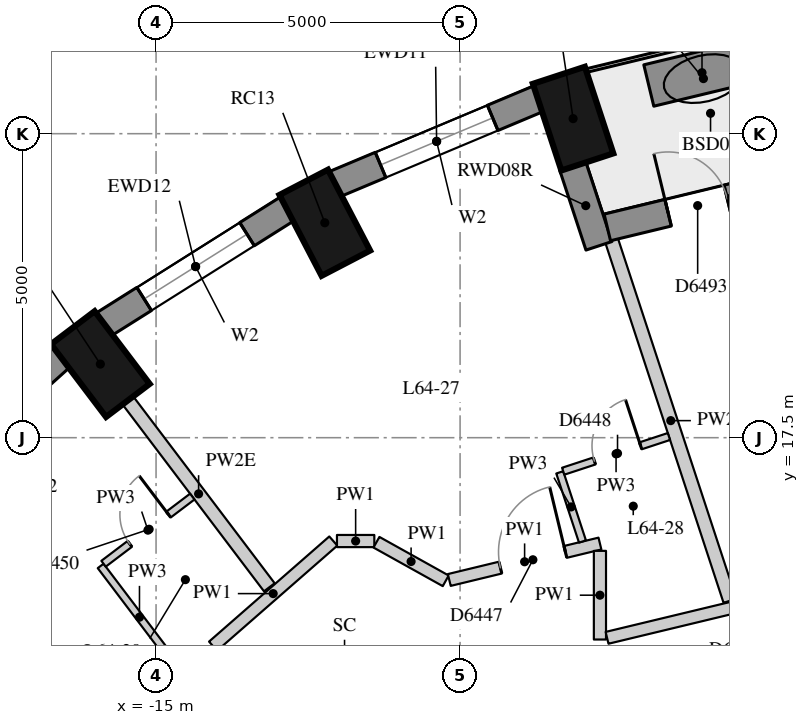
"""IFC4 building model, lengths in metres.
Left out: names, types, materials, properties, quantities, classifications, styles, units other than length and angle.
Written with IfcOpenShell. Run it as: python <this file> out.ifc"""

import sys

from ifc_helpers import new_model, si_unit, direction, frame, frame_2d, origin, origin_2d, place, context, subcontext, project, spatial, rectangle, extrude, element, fill, save


model = new_model("IFC4")
c1 = context("Model", 3, precision=1e-05, world=origin(), true_north=direction((0.0, 1.0)))
c2 = subcontext(c1, "Body", "Model", "MODEL_VIEW")
j1 = project(units=[si_unit("LENGTHUNIT", "METRE"), si_unit("PLANEANGLEUNIT", "RADIAN")], contexts=[c1])
p1 = place(None, origin())
s1 = spatial("IfcSite", under=j1, at=p1, CompositionType="ELEMENT")
p2 = place(p1, origin())
s2 = spatial("IfcBuilding", under=s1, at=p2, CompositionType="ELEMENT")
p3 = place(p2, frame((0.0, 0.0, 225.5)))
s3 = spatial("IfcBuildingStorey", under=s2, at=p3, CompositionType="ELEMENT", Elevation=225.5)
for number, where, z_axis, x_axis in (
    (1, (-8.141, 22.748, 0.0), (0.0, 0.0, 1.0), (-0.312, 0.95, 0.0)),
    (2, (-12.225, 21.035, 0.0), (0.0, 0.0, 1.0), (-0.462, 0.887, 0.0)),
    (3, (-15.916, 18.71, 0.0), (0.0, 0.0, 1.0), (-0.604, 0.797, 0.0)),
):
    element("IfcColumn", number, at=place(p3, frame(where, z_axis=z_axis, x_axis=x_axis)), inside=s3, PredefinedType="COLUMN", context=c2, shape_type="SweptSolid", body=[
        extrude(rectangle(XDim=1.5, YDim=0.9, at=origin_2d()), origin(), (0.0, 0.0, 1.0), 3.3),
    ])
p4 = place(p3, frame((-8.703, 23.079, 0.0), z_axis=(0.0, 0.0, 1.0), x_axis=(-0.922168222612, -0.386789050006, 0.0)))
e4 = element("IfcWall", 4, at=p4, inside=s3, PredefinedType="SOLIDWALL", context=c2, shape_type="SweptSolid", body=[
    extrude(rectangle(XDim=3.651, YDim=0.45, at=frame_2d((1.825, 0.0))), origin(), (0.0, 0.0, 1.0), 2.85),
])
p5 = place(p4, frame((0.825, 0.0, 0.4)))
e5 = element("IfcOpeningElement", 5, at=p5, cuts=e4, PredefinedType="OPENING", context=c2, shape_type="SweptSolid", body=[
    extrude(rectangle(XDim=2.0, YDim=1.75, at=frame_2d((1.0, 0.875))), frame((0.0, 0.235, 0.0), z_axis=(0.0, -1.0, 0.0), x_axis=(1.0, 0.0, 0.0)), (0.0, 0.0, 1.0), 0.47),
])
p6 = place(p3, frame((-12.832, 21.27, 0.0), z_axis=(0.0, 0.0, 1.0), x_axis=(-0.846138482752, -0.532963101918, 0.0)))
e6 = element("IfcWall", 6, at=p6, inside=s3, PredefinedType="SOLIDWALL", context=c2, shape_type="SweptSolid", body=[
    extrude(rectangle(XDim=3.587, YDim=0.45, at=frame_2d((1.793, 0.0))), origin(), (0.0, 0.0, 1.0), 2.85),
])
p7 = place(p6, frame((0.793, 0.0, 0.4)))
e7 = element("IfcOpeningElement", 7, at=p7, cuts=e6, PredefinedType="OPENING", context=c2, shape_type="SweptSolid", body=[
    extrude(rectangle(XDim=2.0, YDim=1.75, at=frame_2d((1.0, 0.875))), frame((0.0, 0.235, 0.0), z_axis=(0.0, -1.0, 0.0), x_axis=(1.0, 0.0, 0.0)), (0.0, 0.0, 1.0), 0.47),
])
p8 = place(p3, frame((-16.553, 18.84, 0.0), z_axis=(0.0, 0.0, 1.0), x_axis=(-0.743442727602, -0.668799604348, 0.0)))
e8 = element("IfcWall", 8, at=p8, inside=s3, PredefinedType="SOLIDWALL", context=c2, shape_type="SweptSolid", body=[
    extrude(rectangle(XDim=3.513, YDim=0.45, at=frame_2d((1.756, 0.0))), origin(), (0.0, 0.0, 1.0), 2.85),
])
p9 = place(p8, frame((0.756, 0.0, 0.4)))
e9 = element("IfcOpeningElement", 9, at=p9, cuts=e8, PredefinedType="OPENING", context=c2, shape_type="SweptSolid", body=[
    extrude(rectangle(XDim=2.0, YDim=1.75, at=frame_2d((1.0, 0.875))), frame((0.0, 0.235, 0.0), z_axis=(0.0, -1.0, 0.0), x_axis=(1.0, 0.0, 0.0)), (0.0, 0.0, 1.0), 0.47),
])
p10 = place(p3, frame((-8.15, 21.977, 0.0), z_axis=(0.0, 0.0, 1.0), x_axis=(0.312062715826, -0.950061504005, 0.0)))
e10 = element("IfcWall", 10, at=p10, inside=s3, PredefinedType="SOLIDWALL", context=c2, shape_type="SweptSolid", body=[
    extrude(rectangle(XDim=1.39, YDim=0.45, at=frame_2d((0.695, 0.0))), origin(), (0.0, 0.0, 1.0), 2.85),
])
p11 = place(p3, frame((-3.489, 21.947, 0.0), z_axis=(0.0, 0.0, 1.0), x_axis=(-0.972007311035, -0.234950606076, 0.0)))
e11 = element("IfcWall", 11, at=p11, inside=s3, PredefinedType="SOLIDWALL", context=c2, shape_type="SweptSolid", body=[
    extrude(rectangle(XDim=4.207, YDim=0.45, at=frame_2d((2.104, 0.0))), origin(), (0.0, 0.0, 1.0), 2.85),
])
p12 = place(p11, frame((1.029, 0.0, 0.4)))
e12 = element("IfcOpeningElement", 12, at=p12, cuts=e11, PredefinedType="OPENING", context=c2, shape_type="SweptSolid", body=[
    extrude(rectangle(XDim=1.0, YDim=1.75, at=frame_2d((0.5, 0.875))), frame((0.0, 0.235, 0.0), z_axis=(0.0, -1.0, 0.0), x_axis=(1.0, 0.0, 0.0)), (0.0, 0.0, 1.0), 0.47),
])
p13 = place(p11, frame((2.179, 0.0, 0.0)))
e13 = element("IfcOpeningElement", 13, at=p13, cuts=e11, PredefinedType="OPENING", context=c2, shape_type="SweptSolid", body=[
    extrude(rectangle(XDim=1.0, YDim=2.15, at=frame_2d((0.5, 1.075))), frame((0.0, 0.235, 0.0), z_axis=(0.0, -1.0, 0.0), x_axis=(1.0, 0.0, 0.0)), (0.0, 0.0, 1.0), 0.47),
])
p14 = place(p3, frame((-5.146, 23.714, 0.0), z_axis=(0.0, 0.0, 1.0), x_axis=(-0.972142986016, -0.234388597717, 0.0)))
e14 = element("IfcWall", 14, at=p14, inside=s3, PredefinedType="USERDEFINED", context=c2, shape_type="SweptSolid", body=[
    extrude(rectangle(XDim=1.8, YDim=0.7, at=frame_2d((0.9, 0.0))), origin(), (0.0, 0.0, 1.0), 0.75),
])
p15 = place(p3, frame((-14.063, 14.071, 0.0), z_axis=(0.0, 0.0, 1.0), x_axis=(0.752870230185, 0.6581689878, 0.0)))
e15 = element("IfcWall", 15, at=p15, inside=s3, PredefinedType="PARTITIONING", context=c2, shape_type="SweptSolid", body=[
    extrude(rectangle(XDim=2.627, YDim=0.2, at=frame_2d((1.313, 0.0))), origin(), (0.0, 0.0, 1.0), 2.85),
])
p16 = place(p3, frame((-12.025, 15.8, 0.0), z_axis=(0.0, 0.0, 1.0), x_axis=(1.0, 0.0, 0.0)))
e16 = element("IfcWall", 16, at=p16, inside=s3, PredefinedType="PARTITIONING", context=c2, shape_type="SweptSolid", body=[
    extrude(rectangle(XDim=0.615, YDim=0.2, at=frame_2d((0.307, 0.0))), origin(), (0.0, 0.0, 1.0), 2.85),
])
p17 = place(p3, frame((-11.375, 15.781, 0.0), z_axis=(0.0, 0.0, 1.0), x_axis=(0.873538410035, -0.486755222051, 0.0)))
e17 = element("IfcWall", 17, at=p17, inside=s3, PredefinedType="PARTITIONING", context=c2, shape_type="SweptSolid", body=[
    extrude(rectangle(XDim=1.304, YDim=0.2, at=frame_2d((0.652, 0.0))), origin(), (0.0, 0.0, 1.0), 2.85),
])
p18 = place(p3, frame((-10.177, 15.16, 0.0), z_axis=(0.0, 0.0, 1.0), x_axis=(0.971984190663, 0.235046236094, 0.0)))
e18 = element("IfcWall", 18, at=p18, inside=s3, PredefinedType="PARTITIONING", context=c2, shape_type="SweptSolid", body=[
    extrude(rectangle(XDim=2.549, YDim=0.2, at=frame_2d((1.274, 0.0))), origin(), (0.0, 0.0, 1.0), 2.85),
])
p19 = place(p18, frame((0.865, 0.0, 0.0)))
e19 = element("IfcOpeningElement", 19, at=p19, cuts=e18, PredefinedType="OPENING", context=c2, shape_type="SweptSolid", body=[
    extrude(rectangle(XDim=1.1, YDim=2.1, at=frame_2d((0.55, 1.05))), frame((0.0, 0.11, 0.0), z_axis=(0.0, -1.0, 0.0), x_axis=(1.0, 0.0, 0.0)), (0.0, 0.0, 1.0), 0.22),
])
p20 = place(p3, frame((-7.7, 15.639, 0.0), z_axis=(0.0, 0.0, 1.0), x_axis=(0.0, -1.0, 0.0)))
e20 = element("IfcWall", 20, at=p20, inside=s3, PredefinedType="PARTITIONING", context=c2, shape_type="SweptSolid", body=[
    extrude(rectangle(XDim=1.458, YDim=0.2, at=frame_2d((0.729, 0.0))), origin(), (0.0, 0.0, 1.0), 2.85),
])
p21 = place(p3, frame((-7.583, 14.208, 0.0), z_axis=(0.0, 0.0, 1.0), x_axis=(0.972284712223, 0.233799996531, 0.0)))
e21 = element("IfcWall", 21, at=p21, inside=s3, PredefinedType="PARTITIONING", context=c2, shape_type="SweptSolid", body=[
    extrude(rectangle(XDim=8.519, YDim=0.2, at=frame_2d((4.259, 0.0))), origin(), (0.0, 0.0, 1.0), 2.25),
])
p22 = place(p21, frame((5.667, 0.0, 0.0)))
e22 = element("IfcOpeningElement", 22, at=p22, cuts=e21, PredefinedType="OPENING", context=c2, shape_type="SweptSolid", body=[
    extrude(rectangle(XDim=0.9, YDim=2.1, at=frame_2d((0.45, 1.05))), frame((0.0, 0.11, 0.0), z_axis=(0.0, -1.0, 0.0), x_axis=(1.0, 0.0, 0.0)), (0.0, 0.0, 1.0), 0.22),
])
p23 = place(p21, frame((2.674, 0.0, 0.0)))
e23 = element("IfcOpeningElement", 23, at=p23, cuts=e21, PredefinedType="OPENING", context=c2, shape_type="SweptSolid", body=[
    extrude(rectangle(XDim=0.9, YDim=2.1, at=frame_2d((0.45, 1.05))), frame((0.0, 0.11, 0.0), z_axis=(0.0, -1.0, 0.0), x_axis=(1.0, 0.0, 0.0)), (0.0, 0.0, 1.0), 0.22),
])
p24 = place(p3, frame((-7.508, 20.743, 0.0), z_axis=(0.0, 0.0, 1.0), x_axis=(0.311985211021, -0.95008695818, 0.0)))
e24 = element("IfcWall", 24, at=p24, inside=s3, PredefinedType="PARTITIONING", context=c2, shape_type="SweptSolid", body=[
    extrude(rectangle(XDim=6.237, YDim=0.22, at=frame_2d((3.118, 0.0))), origin(), (0.0, 0.0, 1.0), 2.85),
])
p25 = place(p3, frame((-15.463, 18.113, 0.0), z_axis=(0.0, 0.0, 1.0), x_axis=(0.603591792806, -0.79729351412, 0.0)))
e25 = element("IfcWall", 25, at=p25, inside=s3, PredefinedType="PARTITIONING", context=c2, shape_type="SweptSolid", body=[
    extrude(rectangle(XDim=3.854, YDim=0.22, at=frame_2d((1.927, 0.0))), origin(), (0.0, 0.0, 1.0), 2.4),
])
p26 = place(p3, frame((-7.987, 15.792, 0.0), z_axis=(0.0, 0.0, 1.0), x_axis=(-0.312187467963, 0.950020518119, 0.0)))
e26 = element("IfcWall", 26, at=p26, inside=s3, PredefinedType="PARTITIONING", context=c2, shape_type="SweptSolid", body=[
    extrude(rectangle(XDim=1.197, YDim=0.12, at=frame_2d((0.599, 0.0))), origin(), (0.0, 0.0, 1.0), 2.85),
])
p27 = place(p3, frame((-14.634, 13.704, 0.0), z_axis=(0.0, 0.0, 1.0), x_axis=(-0.603613230526, 0.797277284221, 0.0)))
e27 = element("IfcWall", 27, at=p27, inside=s3, PredefinedType="PARTITIONING", context=c2, shape_type="SweptSolid", body=[
    extrude(rectangle(XDim=2.115, YDim=0.12, at=frame_2d((1.058, 0.0))), origin(), (0.0, 0.0, 1.0), 2.85),
])
p28 = place(p3, frame((-8.304, 16.948, 0.0), z_axis=(0.0, 0.0, 1.0), x_axis=(0.95011423119, 0.311902144415, 0.0)))
e28 = element("IfcWall", 28, at=p28, inside=s3, PredefinedType="PARTITIONING", context=c2, shape_type="SweptSolid", body=[
    extrude(rectangle(XDim=1.83, YDim=0.12, at=frame_2d((0.915, 0.0))), origin(), (0.0, 0.0, 1.0), 2.85),
])
p29 = place(p28, frame((0.54, 0.0, 0.0)))
e29 = element("IfcOpeningElement", 29, at=p29, cuts=e28, PredefinedType="OPENING", context=c2, shape_type="SweptSolid", body=[
    extrude(rectangle(XDim=0.8, YDim=2.1, at=frame_2d((0.4, 1.05))), frame((0.0, 0.07, 0.0), z_axis=(0.0, -1.0, 0.0), x_axis=(1.0, 0.0, 0.0)), (0.0, 0.0, 1.0), 0.14),
])
p30 = place(p3, frame((-15.863, 15.427, 0.0), z_axis=(0.0, 0.0, 1.0), x_axis=(0.79730226728, 0.603580230451, 0.0)))
e30 = element("IfcWall", 30, at=p30, inside=s3, PredefinedType="PARTITIONING", context=c2, shape_type="SweptSolid", body=[
    extrude(rectangle(XDim=1.83, YDim=0.12, at=frame_2d((0.915, 0.0))), origin(), (0.0, 0.0, 1.0), 2.85),
])
p31 = place(p30, frame((0.54, 0.0, 0.0)))
e31 = element("IfcOpeningElement", 31, at=p31, cuts=e30, PredefinedType="OPENING", context=c2, shape_type="SweptSolid", body=[
    extrude(rectangle(XDim=0.8, YDim=2.1, at=frame_2d((0.4, 1.05))), frame((0.0, 0.07, 0.0), z_axis=(0.0, -1.0, 0.0), x_axis=(1.0, 0.0, 0.0)), (0.0, 0.0, 1.0), 0.14),
])
p32 = place(p5, origin())
e32 = element("IfcWindow", 32, at=p32, inside=s3, PartitioningType="SINGLE_PANEL", PredefinedType="WINDOW", context=c2, shape_type="SweptSolid", body=[
    extrude(rectangle(XDim=2.0, YDim=1.75, at=frame_2d((1.0, 0.875))), frame((0.0, 0.035, 0.0), z_axis=(0.0, -1.0, 0.0), x_axis=(1.0, 0.0, 0.0)), (0.0, 0.0, 1.0), 0.06),
])
fill(e5, e32)
p33 = place(p7, origin())
e33 = element("IfcWindow", 33, at=p33, inside=s3, PartitioningType="SINGLE_PANEL", PredefinedType="WINDOW", context=c2, shape_type="SweptSolid", body=[
    extrude(rectangle(XDim=2.0, YDim=1.75, at=frame_2d((1.0, 0.875))), frame((0.0, 0.035, 0.0), z_axis=(0.0, -1.0, 0.0), x_axis=(1.0, 0.0, 0.0)), (0.0, 0.0, 1.0), 0.06),
])
fill(e7, e33)
p34 = place(p13, frame((1.0, 0.0, 0.0), z_axis=(0.0, 0.0, 1.0), x_axis=(-1.0, 0.0, 0.0)))
e34 = element("IfcDoor", 34, at=p34, inside=s3, OperationType="SINGLE_SWING_LEFT", PredefinedType="DOOR", context=c2, shape_type="SweptSolid", body=[
    extrude(rectangle(XDim=1.0, YDim=2.15, at=frame_2d((0.5, 1.075))), frame((0.0, 0.075, 0.0), z_axis=(0.0, -1.0, 0.0), x_axis=(1.0, 0.0, 0.0)), (0.0, 0.0, 1.0), 0.05),
])
fill(e13, e34)
p35 = place(p19, origin())
e35 = element("IfcDoor", 35, at=p35, inside=s3, OperationType="SINGLE_SWING_RIGHT", PredefinedType="DOOR", context=c2, shape_type="SweptSolid", body=[
    extrude(rectangle(XDim=1.1, YDim=2.1, at=frame_2d((0.55, 1.05))), frame((0.0, 0.025, 0.0), z_axis=(0.0, -1.0, 0.0), x_axis=(1.0, 0.0, 0.0)), (0.0, 0.0, 1.0), 0.05),
])
fill(e19, e35)
p36 = place(p29, origin())
e36 = element("IfcDoor", 36, at=p36, inside=s3, OperationType="SINGLE_SWING_RIGHT", PredefinedType="DOOR", context=c2, shape_type="SweptSolid", body=[
    extrude(rectangle(XDim=0.8, YDim=2.1, at=frame_2d((0.4, 1.05))), frame((0.0, 0.025, 0.0), z_axis=(0.0, -1.0, 0.0), x_axis=(1.0, 0.0, 0.0)), (0.0, 0.0, 1.0), 0.05),
])
fill(e29, e36)
p37 = place(p31, origin())
e37 = element("IfcDoor", 37, at=p37, inside=s3, OperationType="SINGLE_SWING_RIGHT", PredefinedType="DOOR", context=c2, shape_type="SweptSolid", body=[
    extrude(rectangle(XDim=0.8, YDim=2.1, at=frame_2d((0.4, 1.05))), frame((0.0, 0.025, 0.0), z_axis=(0.0, -1.0, 0.0), x_axis=(1.0, 0.0, 0.0)), (0.0, 0.0, 1.0), 0.05),
])
fill(e31, e37)
save(model, sys.argv[1])
